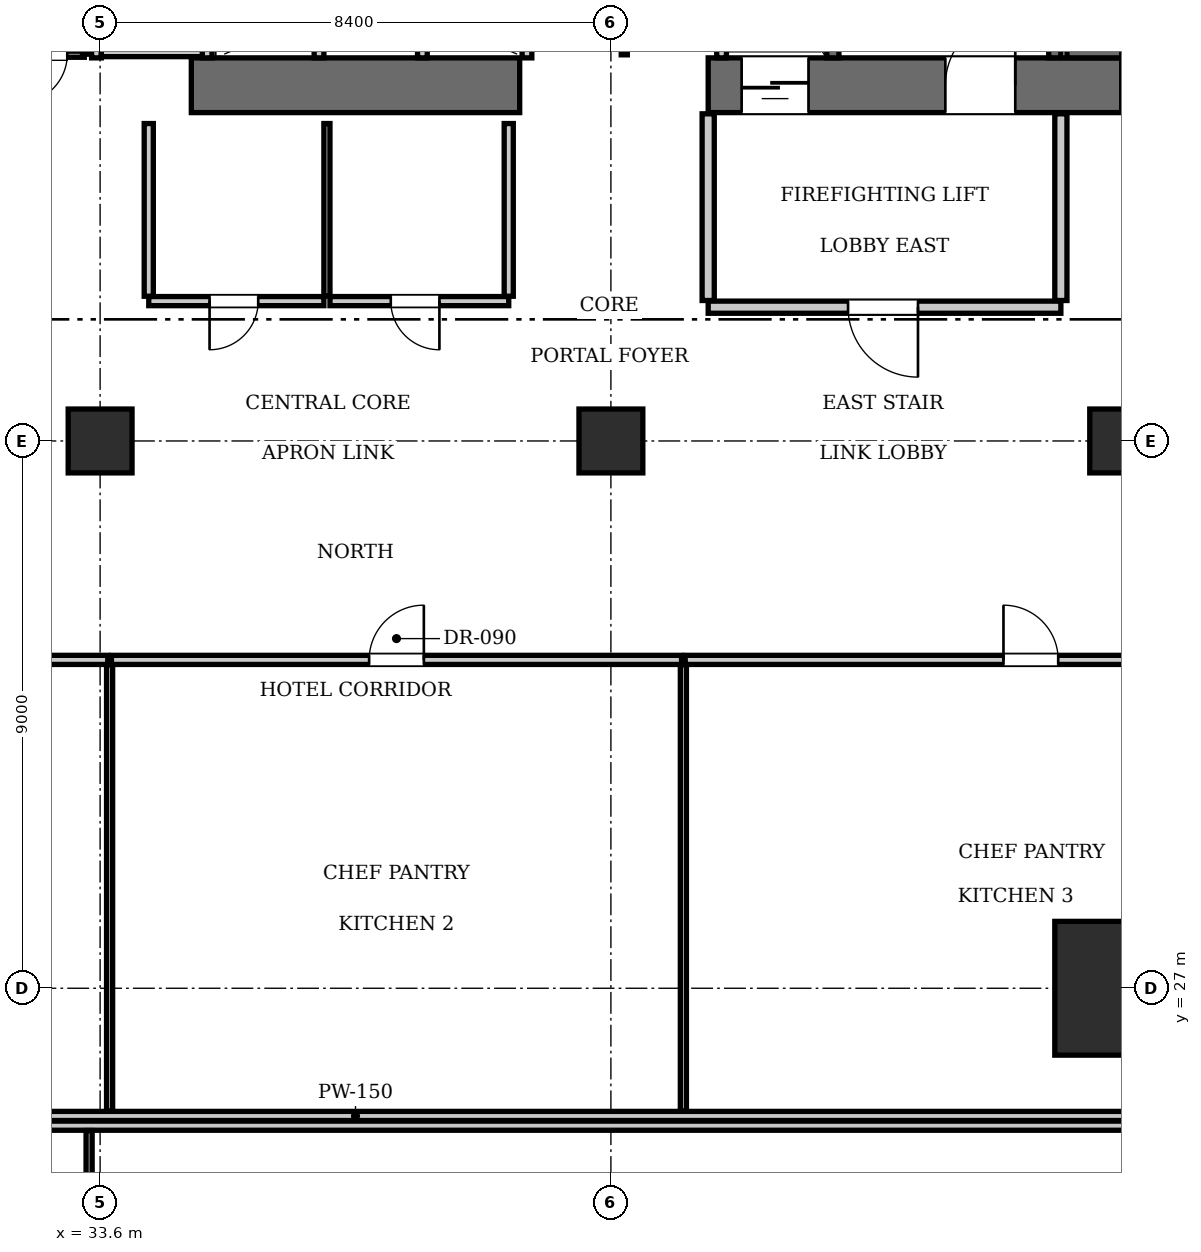
"""IFC4 building model, lengths in metres.
Left out: names, types, materials, properties, quantities, classifications, styles, units other than length and angle.
Written with IfcOpenShell. Run it as: python <this file> out.ifc"""

import sys

from ifc_helpers import new_model, si_unit, direction, frame, frame_2d, origin, origin_2d, place, context, subcontext, project, spatial, rectangle, extrude, element, fill, save


model = new_model("IFC4")
c1 = context("Model", 3, precision=1e-05, world=origin(), true_north=direction((0.0, 1.0)))
c2 = subcontext(c1, "Body", "Model", "MODEL_VIEW")
j1 = project(units=[si_unit("LENGTHUNIT", "METRE"), si_unit("PLANEANGLEUNIT", "RADIAN")], contexts=[c1])
p1 = place(None, origin())
s1 = spatial("IfcSite", under=j1, at=p1, CompositionType="ELEMENT")
p2 = place(p1, origin())
s2 = spatial("IfcBuilding", under=s1, at=p2, CompositionType="ELEMENT")
p3 = place(p2, frame((0.0, 0.0, 107.8)))
s3 = spatial("IfcBuildingStorey", under=s2, at=p3, CompositionType="ELEMENT", Elevation=107.8)
p4 = place(p3, frame((50.4, 27.0, 0.0), z_axis=(0.0, 0.0, 1.0), x_axis=(1.0, 0.0, 0.0)))
e1 = element("IfcColumn", 1, at=p4, inside=s3, PredefinedType="COLUMN", context=c2, shape_type="SweptSolid", body=[
    extrude(rectangle(XDim=2.2, YDim=2.2, at=origin_2d()), origin(), (0.0, 0.0, 1.0), 3.85),
])
p5 = place(p3, frame((35.1, 41.85, 0.0), z_axis=(0.0, 0.0, 1.0), x_axis=(1.0, 0.0, 0.0)))
e2 = element("IfcWall", 2, at=p5, inside=s3, PredefinedType="SHEAR", context=c2, shape_type="SweptSolid", body=[
    extrude(rectangle(XDim=5.4, YDim=0.9, at=frame_2d((2.7, 0.0))), origin(), (0.0, 0.0, 1.0), 3.85),
])
p6 = place(p3, frame((43.6, 41.85, 0.0), z_axis=(0.0, 0.0, 1.0), x_axis=(1.0, 0.0, 0.0)))
e3 = element("IfcWall", 3, at=p6, inside=s3, PredefinedType="SHEAR", context=c2, shape_type="SweptSolid", body=[
    extrude(rectangle(XDim=6.8, YDim=0.9, at=frame_2d((3.4, 0.0))), origin(), (0.0, 0.0, 1.0), 3.85),
])
p7 = place(p6, frame((3.9, 0.0, 0.0)))
e4 = element("IfcOpeningElement", 4, at=p7, cuts=e3, PredefinedType="OPENING", context=c2, shape_type="SweptSolid", body=[
    extrude(rectangle(XDim=1.15, YDim=2.15, at=frame_2d((0.575, 1.075))), frame((0.0, 0.46, 0.0), z_axis=(0.0, -1.0, 0.0), x_axis=(1.0, 0.0, 0.0)), (0.0, 0.0, 1.0), 0.92),
])
p8 = place(p6, frame((0.55, 0.0, 0.0)))
e5 = element("IfcOpeningElement", 5, at=p8, cuts=e3, PredefinedType="OPENING", context=c2, shape_type="SweptSolid", body=[
    extrude(rectangle(XDim=1.1, YDim=2.2, at=frame_2d((0.55, 1.1))), frame((0.0, 0.46, 0.0), z_axis=(0.0, -1.0, 0.0), x_axis=(1.0, 0.0, 0.0)), (0.0, 0.0, 1.0), 0.92),
])
p9 = place(p3, frame((49.95, 42.3, 0.0), z_axis=(0.0, 0.0, 1.0), x_axis=(0.0, 1.0, 0.0)))
e6 = element("IfcWall", 6, at=p9, inside=s3, PredefinedType="SHEAR", context=c2, shape_type="SweptSolid", body=[
    extrude(rectangle(XDim=1.6, YDim=0.9, at=frame_2d((0.8, 0.0))), origin(), (0.0, 0.0, 1.0), 3.85),
])
for number, where, z_axis, x_axis in (
    (7, (33.6, 36.0, 0.0), (0.0, 0.0, 1.0), (1.0, 0.0, 0.0)),
    (8, (42.0, 36.0, 0.0), (0.0, 0.0, 1.0), (1.0, 0.0, 0.0)),
    (9, (50.4, 36.0, 0.0), (0.0, 0.0, 1.0), (1.0, 0.0, 0.0)),
):
    element("IfcColumn", number, at=place(p3, frame(where, z_axis=z_axis, x_axis=x_axis)), inside=s3, PredefinedType="COLUMN", context=c2, shape_type="SweptSolid", body=[
        extrude(rectangle(XDim=1.05, YDim=1.05, at=origin_2d()), origin(), (0.0, 0.0, 1.0), 3.85),
    ])
p10 = place(p3, frame((45.65, 42.3, 0.0), z_axis=(0.0, 0.0, 1.0), x_axis=(0.0, 1.0, 0.0)))
e10 = element("IfcWall", 10, at=p10, inside=s3, PredefinedType="SOLIDWALL", context=c2, shape_type="SweptSolid", body=[
    extrude(rectangle(XDim=8.85, YDim=0.2, at=frame_2d((4.425, 0.0))), origin(), (0.0, 0.0, 1.0), 3.61),
])
p11 = place(p3, frame((49.3, 42.3, 0.0), z_axis=(0.0, 0.0, 1.0), x_axis=(0.0, 1.0, 0.0)))
e11 = element("IfcWall", 11, at=p11, inside=s3, PredefinedType="SOLIDWALL", context=c2, shape_type="SweptSolid", body=[
    extrude(rectangle(XDim=1.58, YDim=0.2, at=frame_2d((0.79, 0.0))), origin(), (0.0, 0.0, 1.0), 3.61),
])
p12 = place(p3, frame((43.82, 42.3, 0.0), z_axis=(0.0, 0.0, 1.0), x_axis=(0.0, 1.0, 0.0)))
e12 = element("IfcWall", 12, at=p12, inside=s3, PredefinedType="SOLIDWALL", context=c2, shape_type="SweptSolid", body=[
    extrude(rectangle(XDim=2.44, YDim=0.16, at=frame_2d((1.22, 0.0))), origin(), (0.0, 0.0, 1.0), 3.61),
])
for number, where, z_axis, x_axis in (
    (13, (37.2, 42.3, 0.0), (0.0, 0.0, 1.0), (0.0, 1.0, 0.0)),
    (14, (38.9, 42.3, 0.0), (0.0, 0.0, 1.0), (0.0, 1.0, 0.0)),
    (15, (40.62, 42.3, 0.0), (0.0, 0.0, 1.0), (0.0, 1.0, 0.0)),
):
    element("IfcWall", number, at=place(p3, frame(where, z_axis=z_axis, x_axis=x_axis)), inside=s3, PredefinedType="SOLIDWALL", context=c2, shape_type="SweptSolid", body=[
        extrude(rectangle(XDim=2.05, YDim=0.16, at=frame_2d((1.025, 0.0))), origin(), (0.0, 0.0, 1.0), 3.61),
    ])
for number, where, z_axis, x_axis in (
    (16, (33.54, 42.3, 0.0), (0.0, 0.0, 1.0), (0.0, 1.0, 0.0)),
    (17, (35.36, 42.3, 0.0), (0.0, 0.0, 1.0), (0.0, 1.0, 0.0)),
):
    element("IfcWall", number, at=place(p3, frame(where, z_axis=z_axis, x_axis=x_axis)), inside=s3, PredefinedType="SOLIDWALL", context=c2, shape_type="SweptSolid", body=[
        extrude(rectangle(XDim=2.1, YDim=0.16, at=frame_2d((1.05, 0.0))), origin(), (0.0, 0.0, 1.0), 3.61),
    ])
p13 = place(p3, frame((33.62, 42.4, 0.0), z_axis=(0.0, 0.0, 1.0), x_axis=(1.0, 0.0, 0.0)))
e18 = element("IfcWall", 18, at=p13, inside=s3, PredefinedType="SOLIDWALL", context=c2, shape_type="SweptSolid", body=[
    extrude(rectangle(XDim=1.66, YDim=0.16, at=frame_2d((0.83, 0.0))), origin(), (0.0, 0.0, 1.0), 3.61),
])
p14 = place(p3, frame((43.6, 38.2, 0.0), z_axis=(0.0, 0.0, 1.0), x_axis=(1.0, 0.0, 0.0)))
e19 = element("IfcWall", 19, at=p14, inside=s3, PredefinedType="PARTITIONING", context=c2, shape_type="SweptSolid", body=[
    extrude(rectangle(XDim=5.8, YDim=0.2, at=frame_2d((2.9, 0.0))), origin(), (0.0, 0.0, 1.0), 3.61),
])
p15 = place(p14, frame((2.3, 0.0, 0.0)))
e20 = element("IfcOpeningElement", 20, at=p15, cuts=e19, PredefinedType="OPENING", context=c2, shape_type="SweptSolid", body=[
    extrude(rectangle(XDim=1.15, YDim=2.15, at=frame_2d((0.575, 1.075))), frame((0.0, 0.11, 0.0), z_axis=(0.0, -1.0, 0.0), x_axis=(1.0, 0.0, 0.0)), (0.0, 0.0, 1.0), 0.22),
])
for number, where, z_axis, x_axis in (
    (21, (43.6, 38.31, 0.0), (0.0, 0.0, 1.0), (0.0, 1.0, 0.0)),
    (22, (49.4, 38.31, 0.0), (0.0, 0.0, 1.0), (0.0, 1.0, 0.0)),
):
    element("IfcWall", number, at=place(p3, frame(where, z_axis=z_axis, x_axis=x_axis)), inside=s3, PredefinedType="PARTITIONING", context=c2, shape_type="SweptSolid", body=[
        extrude(rectangle(XDim=3.07, YDim=0.2, at=frame_2d((1.535, 0.0))), origin(), (0.0, 0.0, 1.0), 3.61),
    ])
p16 = place(p3, frame((32.02, 42.36, 0.0), z_axis=(0.0, 0.0, 1.0), x_axis=(1.0, 0.0, 0.0)))
e23 = element("IfcWall", 23, at=p16, inside=s3, PredefinedType="PARTITIONING", context=c2, shape_type="SweptSolid", body=[
    extrude(rectangle(XDim=1.32, YDim=0.1, at=frame_2d((0.66, 0.0))), origin(), (0.0, 0.0, 1.0), 3.61),
])
p17 = place(p16, frame((0.24, 0.0, 0.0)))
e24 = element("IfcOpeningElement", 24, at=p17, cuts=e23, PredefinedType="OPENING", context=c2, shape_type="SweptSolid", body=[
    extrude(rectangle(XDim=0.8, YDim=2.05, at=frame_2d((0.4, 1.025))), frame((0.0, 0.06, 0.0), z_axis=(0.0, -1.0, 0.0), x_axis=(1.0, 0.0, 0.0)), (0.0, 0.0, 1.0), 0.12),
])
p18 = place(p3, frame((33.36, 42.36, 0.0), z_axis=(0.0, 0.0, 1.0), x_axis=(0.0, 1.0, 0.0)))
e25 = element("IfcWall", 25, at=p18, inside=s3, PredefinedType="PARTITIONING", context=c2, shape_type="SweptSolid", body=[
    extrude(rectangle(XDim=2.58, YDim=0.1, at=frame_2d((1.29, 0.0))), origin(), (0.0, 0.0, 1.0), 3.61),
])
p19 = place(p3, frame((42.22, 42.35, 0.0), z_axis=(0.0, 0.0, 1.0), x_axis=(0.0, 1.0, 0.0)))
e26 = element("IfcWall", 26, at=p19, inside=s3, PredefinedType="PARTITIONING", context=c2, shape_type="SweptSolid", body=[
    extrude(rectangle(XDim=2.61, YDim=0.1, at=frame_2d((1.305, 0.0))), origin(), (0.0, 0.0, 1.0), 3.61),
])
p20 = place(p19, frame((0.65, 0.0, 0.0)))
e27 = element("IfcOpeningElement", 27, at=p20, cuts=e26, PredefinedType="OPENING", context=c2, shape_type="SweptSolid", body=[
    extrude(rectangle(XDim=0.8, YDim=2.05, at=frame_2d((0.4, 1.025))), frame((0.0, 0.06, 0.0), z_axis=(0.0, -1.0, 0.0), x_axis=(1.0, 0.0, 0.0)), (0.0, 0.0, 1.0), 0.12),
])
p21 = place(p3, frame((34.4, 38.3, 0.0), z_axis=(0.0, 0.0, 1.0), x_axis=(1.0, 0.0, 0.0)))
e28 = element("IfcWall", 28, at=p21, inside=s3, PredefinedType="PARTITIONING", context=c2, shape_type="SweptSolid", body=[
    extrude(rectangle(XDim=2.88, YDim=0.15, at=frame_2d((1.44, 0.0))), origin(), (0.0, 0.0, 1.0), 3.61),
])
p22 = place(p21, frame((1.0, 0.0, 0.0)))
e29 = element("IfcOpeningElement", 29, at=p22, cuts=e28, PredefinedType="OPENING", context=c2, shape_type="SweptSolid", body=[
    extrude(rectangle(XDim=0.8, YDim=2.05, at=frame_2d((0.4, 1.025))), frame((0.0, 0.085, 0.0), z_axis=(0.0, -1.0, 0.0), x_axis=(1.0, 0.0, 0.0)), (0.0, 0.0, 1.0), 0.17),
])
p23 = place(p3, frame((37.38, 38.3, 0.0), z_axis=(0.0, 0.0, 1.0), x_axis=(1.0, 0.0, 0.0)))
e30 = element("IfcWall", 30, at=p23, inside=s3, PredefinedType="PARTITIONING", context=c2, shape_type="SweptSolid", body=[
    extrude(rectangle(XDim=2.94, YDim=0.15, at=frame_2d((1.47, 0.0))), origin(), (0.0, 0.0, 1.0), 3.61),
])
p24 = place(p23, frame((1.0, 0.0, 0.0)))
e31 = element("IfcOpeningElement", 31, at=p24, cuts=e30, PredefinedType="OPENING", context=c2, shape_type="SweptSolid", body=[
    extrude(rectangle(XDim=0.8, YDim=2.05, at=frame_2d((0.4, 1.025))), frame((0.0, 0.085, 0.0), z_axis=(0.0, -1.0, 0.0), x_axis=(1.0, 0.0, 0.0)), (0.0, 0.0, 1.0), 0.17),
])
p25 = place(p3, frame((34.4, 38.38, 0.0), z_axis=(0.0, 0.0, 1.0), x_axis=(0.0, 1.0, 0.0)))
e32 = element("IfcWall", 32, at=p25, inside=s3, PredefinedType="PARTITIONING", context=c2, shape_type="SweptSolid", body=[
    extrude(rectangle(XDim=2.84, YDim=0.15, at=frame_2d((1.42, 0.0))), origin(), (0.0, 0.0, 1.0), 3.61),
])
p26 = place(p3, frame((37.33, 38.38, 0.0), z_axis=(0.0, 0.0, 1.0), x_axis=(0.0, 1.0, 0.0)))
e33 = element("IfcWall", 33, at=p26, inside=s3, PredefinedType="PARTITIONING", context=c2, shape_type="SweptSolid", body=[
    extrude(rectangle(XDim=2.84, YDim=0.1, at=frame_2d((1.42, 0.0))), origin(), (0.0, 0.0, 1.0), 3.61),
])
p27 = place(p3, frame((40.32, 38.38, 0.0), z_axis=(0.0, 0.0, 1.0), x_axis=(0.0, 1.0, 0.0)))
e34 = element("IfcWall", 34, at=p27, inside=s3, PredefinedType="PARTITIONING", context=c2, shape_type="SweptSolid", body=[
    extrude(rectangle(XDim=2.84, YDim=0.15, at=frame_2d((1.42, 0.0))), origin(), (0.0, 0.0, 1.0), 3.61),
])
p28 = place(p3, frame((20.95, 24.9, 0.0), z_axis=(0.0, 0.0, 1.0), x_axis=(1.0, 0.0, 0.0)))
e35 = element("IfcWall", 35, at=p28, inside=s3, PredefinedType="PARTITIONING", context=c2, shape_type="SweptSolid", body=[
    extrude(rectangle(XDim=33.7, YDim=0.15, at=frame_2d((16.85, 0.0))), origin(), (0.0, 0.0, 1.0), 3.61),
])
p29 = place(p3, frame((26.372, 32.4, 0.0), z_axis=(0.0, 0.0, 1.0), x_axis=(1.0, 0.0, 0.0)))
e36 = element("IfcWall", 36, at=p29, inside=s3, PredefinedType="PARTITIONING", context=c2, shape_type="SweptSolid", body=[
    extrude(rectangle(XDim=7.354, YDim=0.15, at=frame_2d((3.677, 0.0))), origin(), (0.0, 0.0, 1.0), 3.61),
])
p30 = place(p29, frame((3.227, 0.0, 0.0)))
e37 = element("IfcOpeningElement", 37, at=p30, cuts=e36, PredefinedType="OPENING", context=c2, shape_type="SweptSolid", body=[
    extrude(rectangle(XDim=0.9, YDim=2.1, at=frame_2d((0.45, 1.05))), frame((0.0, 0.085, 0.0), z_axis=(0.0, -1.0, 0.0), x_axis=(1.0, 0.0, 0.0)), (0.0, 0.0, 1.0), 0.17),
])
p31 = place(p3, frame((33.756, 24.98, 0.0), z_axis=(0.0, 0.0, 1.0), x_axis=(0.0, 1.0, 0.0)))
e38 = element("IfcWall", 38, at=p31, inside=s3, PredefinedType="PARTITIONING", context=c2, shape_type="SweptSolid", body=[
    extrude(rectangle(XDim=7.34, YDim=0.1, at=frame_2d((3.67, 0.0))), origin(), (0.0, 0.0, 1.0), 2.999),
])
p32 = place(p3, frame((33.786, 32.4, 0.0), z_axis=(0.0, 0.0, 1.0), x_axis=(1.0, 0.0, 0.0)))
e39 = element("IfcWall", 39, at=p32, inside=s3, PredefinedType="PARTITIONING", context=c2, shape_type="SweptSolid", body=[
    extrude(rectangle(XDim=9.376, YDim=0.15, at=frame_2d((4.688, 0.0))), origin(), (0.0, 0.0, 1.0), 3.61),
])
p33 = place(p32, frame((4.238, 0.0, 0.0)))
e40 = element("IfcOpeningElement", 40, at=p33, cuts=e39, PredefinedType="OPENING", context=c2, shape_type="SweptSolid", body=[
    extrude(rectangle(XDim=0.9, YDim=2.1, at=frame_2d((0.45, 1.05))), frame((0.0, 0.085, 0.0), z_axis=(0.0, -1.0, 0.0), x_axis=(1.0, 0.0, 0.0)), (0.0, 0.0, 1.0), 0.17),
])
p34 = place(p3, frame((43.192, 24.98, 0.0), z_axis=(0.0, 0.0, 1.0), x_axis=(0.0, 1.0, 0.0)))
e41 = element("IfcWall", 41, at=p34, inside=s3, PredefinedType="PARTITIONING", context=c2, shape_type="SweptSolid", body=[
    extrude(rectangle(XDim=7.34, YDim=0.1, at=frame_2d((3.67, 0.0))), origin(), (0.0, 0.0, 1.0), 3.61),
])
p35 = place(p3, frame((43.222, 32.4, 0.0), z_axis=(0.0, 0.0, 1.0), x_axis=(1.0, 0.0, 0.0)))
e42 = element("IfcWall", 42, at=p35, inside=s3, PredefinedType="PARTITIONING", context=c2, shape_type="SweptSolid", body=[
    extrude(rectangle(XDim=11.368, YDim=0.15, at=frame_2d((5.684, 0.0))), origin(), (0.0, 0.0, 1.0), 3.61),
])
p36 = place(p35, frame((5.234, 0.0, 0.0)))
e43 = element("IfcOpeningElement", 43, at=p36, cuts=e42, PredefinedType="OPENING", context=c2, shape_type="SweptSolid", body=[
    extrude(rectangle(XDim=0.9, YDim=2.1, at=frame_2d((0.45, 1.05))), frame((0.0, 0.085, 0.0), z_axis=(0.0, -1.0, 0.0), x_axis=(1.0, 0.0, 0.0)), (0.0, 0.0, 1.0), 0.17),
])
p37 = place(p3, frame((20.95, 24.74, 0.0), z_axis=(0.0, 0.0, 1.0), x_axis=(1.0, 0.0, 0.0)))
e44 = element("IfcWall", 44, at=p37, inside=s3, PredefinedType="PARTITIONING", context=c2, shape_type="SweptSolid", body=[
    extrude(rectangle(XDim=33.7, YDim=0.15, at=frame_2d((16.85, 0.0))), origin(), (0.0, 0.0, 1.0), 3.61),
])
p38 = place(p3, frame((33.419, 17.33, 0.0), z_axis=(0.0, 0.0, 1.0), x_axis=(0.0, 1.0, 0.0)))
e45 = element("IfcWall", 45, at=p38, inside=s3, PredefinedType="PARTITIONING", context=c2, shape_type="SweptSolid", body=[
    extrude(rectangle(XDim=7.33, YDim=0.1, at=frame_2d((3.665, 0.0))), origin(), (0.0, 0.0, 1.0), 2.999),
])
p39 = place(p7, origin())
e46 = element("IfcDoor", 46, at=p39, inside=s3, OperationType="SINGLE_SWING_RIGHT", PredefinedType="DOOR", context=c2, shape_type="SweptSolid", body=[
    extrude(rectangle(XDim=1.15, YDim=2.15, at=frame_2d((0.575, 1.075))), frame((0.0, 0.025, 0.0), z_axis=(0.0, -1.0, 0.0), x_axis=(1.0, 0.0, 0.0)), (0.0, 0.0, 1.0), 0.05),
])
fill(e4, e46)
p40 = place(p8, frame((1.1, 0.0, 0.0), z_axis=(0.0, 0.0, 1.0), x_axis=(-1.0, 0.0, 0.0)))
e47 = element("IfcDoor", 47, at=p40, inside=s3, OperationType="SLIDING_TO_LEFT", PredefinedType="DOOR", context=c2, shape_type="SweptSolid", body=[
    extrude(rectangle(XDim=1.1, YDim=2.2, at=frame_2d((0.55, 1.1))), frame((0.0, 0.025, 0.0), z_axis=(0.0, -1.0, 0.0), x_axis=(1.0, 0.0, 0.0)), (0.0, 0.0, 1.0), 0.05),
])
fill(e5, e47)
p41 = place(p15, frame((1.15, 0.0, 0.0), z_axis=(0.0, 0.0, 1.0), x_axis=(-1.0, 0.0, 0.0)))
e48 = element("IfcDoor", 48, at=p41, inside=s3, OperationType="SINGLE_SWING_LEFT", PredefinedType="DOOR", context=c2, shape_type="SweptSolid", body=[
    extrude(rectangle(XDim=1.15, YDim=2.15, at=frame_2d((0.575, 1.075))), frame((0.0, 0.025, 0.0), z_axis=(0.0, -1.0, 0.0), x_axis=(1.0, 0.0, 0.0)), (0.0, 0.0, 1.0), 0.05),
])
fill(e20, e48)
p42 = place(p17, frame((0.8, 0.0, 0.0), z_axis=(0.0, 0.0, 1.0), x_axis=(-1.0, 0.0, 0.0)))
e49 = element("IfcDoor", 49, at=p42, inside=s3, OperationType="SINGLE_SWING_RIGHT", PredefinedType="DOOR", context=c2, shape_type="SweptSolid", body=[
    extrude(rectangle(XDim=0.8, YDim=2.05, at=frame_2d((0.4, 1.025))), frame((0.0, 0.025, 0.0), z_axis=(0.0, -1.0, 0.0), x_axis=(1.0, 0.0, 0.0)), (0.0, 0.0, 1.0), 0.05),
])
fill(e24, e49)
p43 = place(p22, frame((0.8, 0.0, 0.0), z_axis=(0.0, 0.0, 1.0), x_axis=(-1.0, 0.0, 0.0)))
e50 = element("IfcDoor", 50, at=p43, inside=s3, OperationType="SINGLE_SWING_RIGHT", PredefinedType="DOOR", context=c2, shape_type="SweptSolid", body=[
    extrude(rectangle(XDim=0.8, YDim=2.05, at=frame_2d((0.4, 1.025))), frame((0.0, 0.025, 0.0), z_axis=(0.0, -1.0, 0.0), x_axis=(1.0, 0.0, 0.0)), (0.0, 0.0, 1.0), 0.05),
])
fill(e29, e50)
p44 = place(p24, frame((0.8, 0.0, 0.0), z_axis=(0.0, 0.0, 1.0), x_axis=(-1.0, 0.0, 0.0)))
e51 = element("IfcDoor", 51, at=p44, inside=s3, OperationType="SINGLE_SWING_LEFT", PredefinedType="DOOR", context=c2, shape_type="SweptSolid", body=[
    extrude(rectangle(XDim=0.8, YDim=2.05, at=frame_2d((0.4, 1.025))), frame((0.0, 0.025, 0.0), z_axis=(0.0, -1.0, 0.0), x_axis=(1.0, 0.0, 0.0)), (0.0, 0.0, 1.0), 0.05),
])
fill(e31, e51)
p45 = place(p33, origin())
e52 = element("IfcDoor", 52, at=p45, inside=s3, OperationType="SINGLE_SWING_RIGHT", PredefinedType="DOOR", context=c2, shape_type="SweptSolid", body=[
    extrude(rectangle(XDim=0.9, YDim=2.1, at=frame_2d((0.45, 1.05))), frame((0.0, 0.025, 0.0), z_axis=(0.0, -1.0, 0.0), x_axis=(1.0, 0.0, 0.0)), (0.0, 0.0, 1.0), 0.05),
])
fill(e40, e52)
p46 = place(p36, origin())
e53 = element("IfcDoor", 53, at=p46, inside=s3, OperationType="SINGLE_SWING_LEFT", PredefinedType="DOOR", context=c2, shape_type="SweptSolid", body=[
    extrude(rectangle(XDim=0.9, YDim=2.1, at=frame_2d((0.45, 1.05))), frame((0.0, 0.025, 0.0), z_axis=(0.0, -1.0, 0.0), x_axis=(1.0, 0.0, 0.0)), (0.0, 0.0, 1.0), 0.05),
])
fill(e43, e53)
save(model, sys.argv[1])
